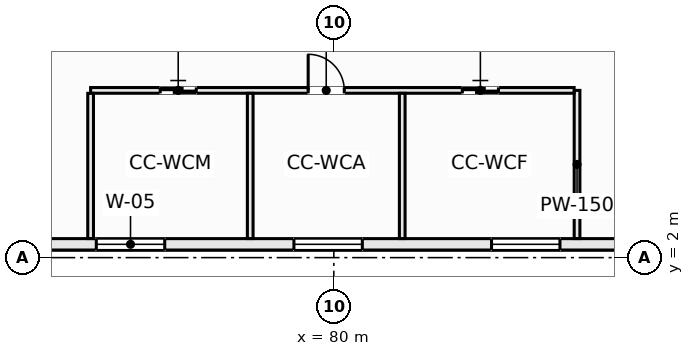
"""IFC4 building model, lengths in metres.
Left out: names, types, materials, properties, quantities, classifications, styles, units other than length and angle.
Written with IfcOpenShell. Run it as: python <this file> out.ifc"""

import sys

from ifc_helpers import new_model, si_unit, direction, frame, frame_2d, origin, place, context, subcontext, project, spatial, rectangle, extrude, element, fill, save


model = new_model("IFC4")
c1 = context("Model", 3, precision=1e-05, world=origin(), true_north=direction((0.0, 1.0)))
c2 = subcontext(c1, "Body", "Model", "MODEL_VIEW")
j1 = project(units=[si_unit("LENGTHUNIT", "METRE"), si_unit("PLANEANGLEUNIT", "RADIAN")], contexts=[c1])
p1 = place(None, origin())
s1 = spatial("IfcSite", under=j1, at=p1, CompositionType="ELEMENT")
p2 = place(p1, origin())
s2 = spatial("IfcBuilding", under=s1, at=p2, CompositionType="ELEMENT")
p3 = place(p2, frame((0.0, 0.0, 10.0)))
s3 = spatial("IfcBuildingStorey", under=s2, at=p3, CompositionType="ELEMENT", Elevation=10.0)
p4 = place(p3, frame((62.35, 2.35, 0.0), z_axis=(0.0, 0.0, 1.0), x_axis=(1.0, 0.0, 0.0)))
e1 = element("IfcWall", 1, at=p4, inside=s3, PredefinedType="SOLIDWALL", context=c2, shape_type="SweptSolid", body=[
    extrude(rectangle(XDim=35.3, YDim=0.3, at=frame_2d((17.65, 0.0))), origin(), (0.0, 0.0, 1.0), 4.76),
])
p5 = place(p4, frame((11.4, 0.0, 0.9)))
e2 = element("IfcOpeningElement", 2, at=p5, cuts=e1, PredefinedType="OPENING", context=c2, shape_type="SweptSolid", body=[
    extrude(rectangle(XDim=1.8, YDim=1.65, at=frame_2d((0.9, 0.825))), frame((0.0, 0.16, 0.0), z_axis=(0.0, -1.0, 0.0), x_axis=(1.0, 0.0, 0.0)), (0.0, 0.0, 1.0), 0.32),
])
p6 = place(p4, frame((16.6, 0.0, 0.9)))
e3 = element("IfcOpeningElement", 3, at=p6, cuts=e1, PredefinedType="OPENING", context=c2, shape_type="SweptSolid", body=[
    extrude(rectangle(XDim=1.8, YDim=1.65, at=frame_2d((0.9, 0.825))), frame((0.0, 0.16, 0.0), z_axis=(0.0, -1.0, 0.0), x_axis=(1.0, 0.0, 0.0)), (0.0, 0.0, 1.0), 0.32),
])
p7 = place(p4, frame((21.8, 0.0, 0.9)))
e4 = element("IfcOpeningElement", 4, at=p7, cuts=e1, PredefinedType="OPENING", context=c2, shape_type="SweptSolid", body=[
    extrude(rectangle(XDim=1.8, YDim=1.65, at=frame_2d((0.9, 0.825))), frame((0.0, 0.16, 0.0), z_axis=(0.0, -1.0, 0.0), x_axis=(1.0, 0.0, 0.0)), (0.0, 0.0, 1.0), 0.32),
])
p8 = place(p3, frame((86.4, 2.502, 0.0), z_axis=(0.0, 0.0, 1.0), x_axis=(0.0, 1.0, 0.0)))
e5 = element("IfcWall", 5, at=p8, inside=s3, PredefinedType="PARTITIONING", context=c2, shape_type="SweptSolid", body=[
    extrude(rectangle(XDim=3.898, YDim=0.15, at=frame_2d((1.949, 0.0))), origin(), (0.0, 0.0, 1.0), 4.76),
])
p9 = place(p3, frame((73.6, 6.4, 0.0), z_axis=(0.0, 0.0, 1.0), x_axis=(1.0, 0.0, 0.0)))
e6 = element("IfcWall", 6, at=p9, inside=s3, PredefinedType="PARTITIONING", context=c2, shape_type="SweptSolid", body=[
    extrude(rectangle(XDim=12.723, YDim=0.15, at=frame_2d((6.361, 0.0))), origin(), (0.0, 0.0, 1.0), 4.76),
])
p10 = place(p9, frame((1.83, 0.0, 0.0)))
e7 = element("IfcOpeningElement", 7, at=p10, cuts=e6, PredefinedType="OPENING", context=c2, shape_type="SweptSolid", body=[
    extrude(rectangle(XDim=0.95, YDim=2.1, at=frame_2d((0.475, 1.05))), frame((0.0, 0.085, 0.0), z_axis=(0.0, -1.0, 0.0), x_axis=(1.0, 0.0, 0.0)), (0.0, 0.0, 1.0), 0.17),
])
p11 = place(p9, frame((5.725, 0.0, 0.0)))
e8 = element("IfcOpeningElement", 8, at=p11, cuts=e6, PredefinedType="OPENING", context=c2, shape_type="SweptSolid", body=[
    extrude(rectangle(XDim=0.95, YDim=2.1, at=frame_2d((0.475, 1.05))), frame((0.0, 0.085, 0.0), z_axis=(0.0, -1.0, 0.0), x_axis=(1.0, 0.0, 0.0)), (0.0, 0.0, 1.0), 0.17),
])
p12 = place(p9, frame((9.781, 0.0, 0.0)))
e9 = element("IfcOpeningElement", 9, at=p12, cuts=e6, PredefinedType="OPENING", context=c2, shape_type="SweptSolid", body=[
    extrude(rectangle(XDim=0.95, YDim=2.1, at=frame_2d((0.475, 1.05))), frame((0.0, 0.085, 0.0), z_axis=(0.0, -1.0, 0.0), x_axis=(1.0, 0.0, 0.0)), (0.0, 0.0, 1.0), 0.17),
])
for number, where, z_axis, x_axis in (
    (10, (73.6, 2.502, 0.0), (0.0, 0.0, 1.0), (0.0, 1.0, 0.0)),
    (11, (77.8, 2.502, 0.0), (0.0, 0.0, 1.0), (0.0, 1.0, 0.0)),
    (12, (81.8, 2.502, 0.0), (0.0, 0.0, 1.0), (0.0, 1.0, 0.0)),
):
    element("IfcWall", number, at=place(p3, frame(where, z_axis=z_axis, x_axis=x_axis)), inside=s3, PredefinedType="PARTITIONING", context=c2, shape_type="SweptSolid", body=[
        extrude(rectangle(XDim=3.821, YDim=0.15, at=frame_2d((1.911, 0.0))), origin(), (0.0, 0.0, 1.0), 4.76),
    ])
p13 = place(p5, origin())
e13 = element("IfcWindow", 13, at=p13, inside=s3, PartitioningType="SINGLE_PANEL", PredefinedType="WINDOW", context=c2, shape_type="SweptSolid", body=[
    extrude(rectangle(XDim=1.8, YDim=1.65, at=frame_2d((0.9, 0.825))), frame((0.0, 0.03, 0.0), z_axis=(0.0, -1.0, 0.0), x_axis=(1.0, 0.0, 0.0)), (0.0, 0.0, 1.0), 0.06),
])
fill(e2, e13)
p14 = place(p6, origin())
e14 = element("IfcWindow", 14, at=p14, inside=s3, PartitioningType="SINGLE_PANEL", PredefinedType="WINDOW", context=c2, shape_type="SweptSolid", body=[
    extrude(rectangle(XDim=1.8, YDim=1.65, at=frame_2d((0.9, 0.825))), frame((0.0, 0.03, 0.0), z_axis=(0.0, -1.0, 0.0), x_axis=(1.0, 0.0, 0.0)), (0.0, 0.0, 1.0), 0.06),
])
fill(e3, e14)
p15 = place(p7, origin())
e15 = element("IfcWindow", 15, at=p15, inside=s3, PartitioningType="SINGLE_PANEL", PredefinedType="WINDOW", context=c2, shape_type="SweptSolid", body=[
    extrude(rectangle(XDim=1.8, YDim=1.65, at=frame_2d((0.9, 0.825))), frame((0.0, 0.03, 0.0), z_axis=(0.0, -1.0, 0.0), x_axis=(1.0, 0.0, 0.0)), (0.0, 0.0, 1.0), 0.06),
])
fill(e4, e15)
p16 = place(p10, origin())
e16 = element("IfcDoor", 16, at=p16, inside=s3, OperationType="SINGLE_SWING_RIGHT", PredefinedType="DOOR", context=c2, shape_type="SweptSolid", body=[
    extrude(rectangle(XDim=0.95, YDim=2.1, at=frame_2d((0.475, 1.05))), frame((0.0, 0.025, 0.0), z_axis=(0.0, -1.0, 0.0), x_axis=(1.0, 0.0, 0.0)), (0.0, 0.0, 1.0), 0.05),
])
fill(e7, e16)
p17 = place(p11, origin())
e17 = element("IfcDoor", 17, at=p17, inside=s3, OperationType="SINGLE_SWING_LEFT", PredefinedType="DOOR", context=c2, shape_type="SweptSolid", body=[
    extrude(rectangle(XDim=0.95, YDim=2.1, at=frame_2d((0.475, 1.05))), frame((0.0, 0.025, 0.0), z_axis=(0.0, -1.0, 0.0), x_axis=(1.0, 0.0, 0.0)), (0.0, 0.0, 1.0), 0.05),
])
fill(e8, e17)
p18 = place(p12, origin())
e18 = element("IfcDoor", 18, at=p18, inside=s3, OperationType="SINGLE_SWING_RIGHT", PredefinedType="DOOR", context=c2, shape_type="SweptSolid", body=[
    extrude(rectangle(XDim=0.95, YDim=2.1, at=frame_2d((0.475, 1.05))), frame((0.0, 0.025, 0.0), z_axis=(0.0, -1.0, 0.0), x_axis=(1.0, 0.0, 0.0)), (0.0, 0.0, 1.0), 0.05),
])
fill(e9, e18)
save(model, sys.argv[1])
